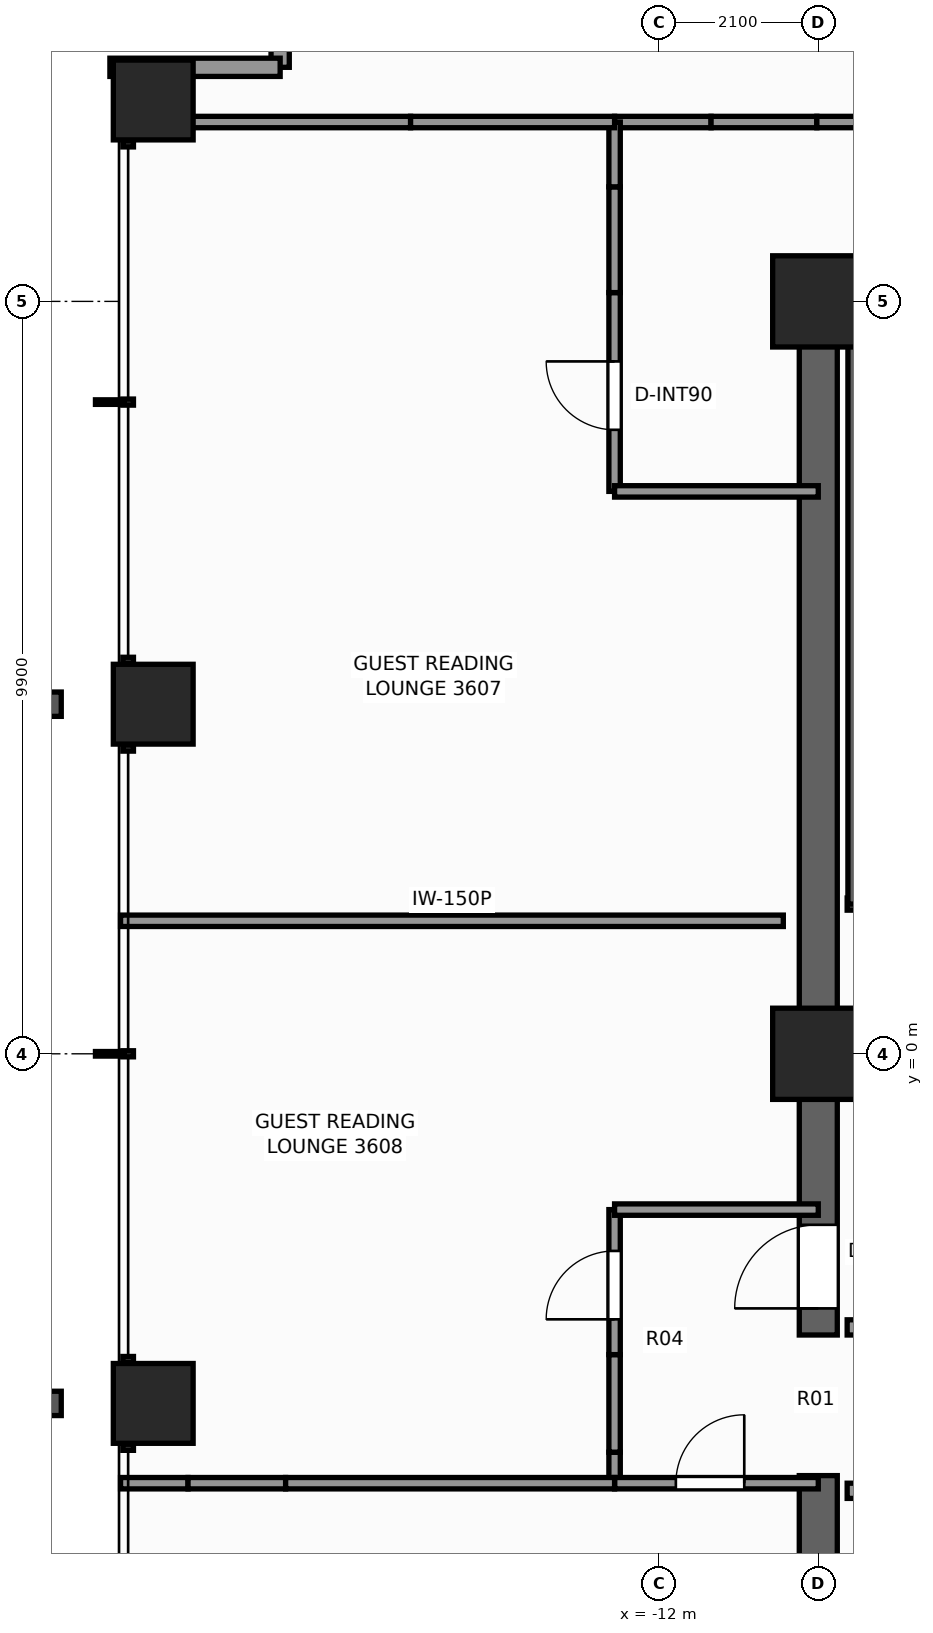
"""IFC4 building model, lengths in metres.
Left out: names, types, materials, properties, quantities, classifications, styles, units other than length and angle.
Written with IfcOpenShell. Run it as: python <this file> out.ifc"""

import sys

from ifc_helpers import new_model, si_unit, direction, frame, frame_2d, origin, origin_2d, place, context, subcontext, project, spatial, rectangle, extrude, element, fill, save


model = new_model("IFC4")
c1 = context("Model", 3, precision=1e-05, world=origin(), true_north=direction((0.0, 1.0)))
c2 = subcontext(c1, "Body", "Model", "MODEL_VIEW")
j1 = project(units=[si_unit("LENGTHUNIT", "METRE"), si_unit("PLANEANGLEUNIT", "RADIAN")], contexts=[c1])
p1 = place(None, origin())
s1 = spatial("IfcSite", under=j1, at=p1, CompositionType="ELEMENT")
p2 = place(p1, origin())
s2 = spatial("IfcBuilding", under=s1, at=p2, CompositionType="ELEMENT")
p3 = place(p2, frame((0.0, 0.0, 125.0)))
s3 = spatial("IfcBuildingStorey", under=s2, at=p3, CompositionType="ELEMENT", Elevation=125.0)
p4 = place(p3, frame((-10.15, 9.9, 0.0), z_axis=(0.0, 0.0, 1.0), x_axis=(1.0, 0.0, 0.0)))
e1 = element("IfcWall", 1, at=p4, inside=s3, PredefinedType="SHEAR", context=c2, shape_type="SweptSolid", body=[
    extrude(rectangle(XDim=14.57, YDim=0.5, at=frame_2d((7.285, 0.0))), origin(), (0.0, 0.0, 1.0), 3.3),
])
p5 = place(p3, frame((-9.9, -9.65, 0.0), z_axis=(0.0, 0.0, 1.0), x_axis=(0.0, 1.0, 0.0)))
e2 = element("IfcWall", 2, at=p5, inside=s3, PredefinedType="SHEAR", context=c2, shape_type="SweptSolid", body=[
    extrude(rectangle(XDim=4.1, YDim=0.5, at=frame_2d((2.05, 0.0))), origin(), (0.0, 0.0, 1.0), 3.3),
])
p6 = place(p3, frame((-9.9, -3.7, 0.0), z_axis=(0.0, 0.0, 1.0), x_axis=(0.0, 1.0, 0.0)))
e3 = element("IfcWall", 3, at=p6, inside=s3, PredefinedType="SHEAR", context=c2, shape_type="SweptSolid", body=[
    extrude(rectangle(XDim=13.35, YDim=0.5, at=frame_2d((6.675, 0.0))), origin(), (0.0, 0.0, 1.0), 3.3),
])
p7 = place(p6, frame((0.35, 0.0, 0.0)))
e4 = element("IfcOpeningElement", 4, at=p7, cuts=e3, PredefinedType="OPENING", context=c2, shape_type="SweptSolid", body=[
    extrude(rectangle(XDim=1.1, YDim=2.2, at=frame_2d((0.55, 1.1))), frame((0.0, 0.26, 0.0), z_axis=(0.0, -1.0, 0.0), x_axis=(1.0, 0.0, 0.0)), (0.0, 0.0, 1.0), 0.52),
])
for number, where, z_axis, x_axis in (
    (5, (-9.9, 9.9, 0.0), (0.0, 0.0, 1.0), (1.0, 0.0, 0.0)),
    (6, (-9.9, 0.0, 0.0), (0.0, 0.0, 1.0), (1.0, 0.0, 0.0)),
):
    element("IfcColumn", number, at=place(p3, frame(where, z_axis=z_axis, x_axis=x_axis)), inside=s3, PredefinedType="COLUMN", context=c2, shape_type="SweptSolid", body=[
        extrude(rectangle(XDim=1.2, YDim=1.2, at=origin_2d()), origin(), (0.0, 0.0, 1.0), 3.3),
    ])
for number, where, z_axis, x_axis in (
    (7, (-18.65, -4.6, 0.0), (0.0, 0.0, 1.0), (1.0, 0.0, 0.0)),
    (8, (-18.65, 4.6, 0.0), (0.0, 0.0, 1.0), (1.0, 0.0, 0.0)),
    (9, (-18.65, 12.55, 0.0), (0.0, 0.0, 1.0), (1.0, 0.0, 0.0)),
):
    element("IfcColumn", number, at=place(p3, frame(where, z_axis=z_axis, x_axis=x_axis)), inside=s3, PredefinedType="COLUMN", context=c2, shape_type="SweptSolid", body=[
        extrude(rectangle(XDim=1.05, YDim=1.05, at=origin_2d()), origin(), (0.0, 0.0, 1.0), 3.3),
    ])
for number, where, z_axis, x_axis in (
    (10, (-16.98, 12.98, 0.0), (0.0, 0.0, 1.0), (0.0, 1.0, 0.0)),
    (11, (-19.22, 12.98, 0.0), (0.0, 0.0, 1.0), (1.0, 0.0, 0.0)),
):
    element("IfcWall", number, at=place(p3, frame(where, z_axis=z_axis, x_axis=x_axis)), inside=s3, PredefinedType="STANDARD", context=c2, shape_type="SweptSolid", body=[
        extrude(rectangle(XDim=2.24, YDim=0.24, at=frame_2d((1.12, 0.0))), origin(), (0.0, 0.0, 1.0), 1.295),
    ])
p8 = place(p3, frame((-9.52, 1.97, 0.0), z_axis=(0.0, 0.0, 1.0), x_axis=(1.0, 0.0, 0.0)))
e12 = element("IfcWall", 12, at=p8, inside=s3, PredefinedType="SHEAR", context=c2, shape_type="SweptSolid", body=[
    extrude(rectangle(XDim=3.52, YDim=0.16, at=frame_2d((1.76, 0.0))), origin(), (0.0, 0.0, 1.0), 3.3),
])
p9 = place(p8, frame((1.15, 0.0, 0.0)))
e13 = element("IfcOpeningElement", 13, at=p9, cuts=e12, PredefinedType="OPENING", context=c2, shape_type="SweptSolid", body=[
    extrude(rectangle(XDim=1.1, YDim=2.2, at=frame_2d((0.55, 1.1))), frame((0.0, 0.09, 0.0), z_axis=(0.0, -1.0, 0.0), x_axis=(1.0, 0.0, 0.0)), (0.0, 0.0, 1.0), 0.18),
])
p10 = place(p3, frame((-9.52, 9.53, 0.0), z_axis=(0.0, 0.0, 1.0), x_axis=(1.0, 0.0, 0.0)))
e14 = element("IfcWall", 14, at=p10, inside=s3, PredefinedType="SHEAR", context=c2, shape_type="SweptSolid", body=[
    extrude(rectangle(XDim=3.52, YDim=0.16, at=frame_2d((1.76, 0.0))), origin(), (0.0, 0.0, 1.0), 3.3),
])
p11 = place(p3, frame((-9.43, 1.97, 0.0), z_axis=(0.0, 0.0, 1.0), x_axis=(0.0, 1.0, 0.0)))
e15 = element("IfcWall", 15, at=p11, inside=s3, PredefinedType="SHEAR", context=c2, shape_type="SweptSolid", body=[
    extrude(rectangle(XDim=7.56, YDim=0.16, at=frame_2d((3.78, 0.0))), origin(), (0.0, 0.0, 1.0), 3.3),
])
p12 = place(p3, frame((-9.52, -3.6, 0.0), z_axis=(0.0, 0.0, 1.0), x_axis=(1.0, 0.0, 0.0)))
e16 = element("IfcWall", 16, at=p12, inside=s3, PredefinedType="SOLIDWALL", context=c2, shape_type="SweptSolid", body=[
    extrude(rectangle(XDim=3.77, YDim=0.2, at=frame_2d((1.885, 0.0))), origin(), (0.0, 0.0, 1.0), 3.1),
])
p13 = place(p12, frame((1.15, 0.0, 0.0)))
e17 = element("IfcOpeningElement", 17, at=p13, cuts=e16, PredefinedType="OPENING", context=c2, shape_type="SweptSolid", body=[
    extrude(rectangle(XDim=0.95, YDim=2.06, at=frame_2d((0.475, 1.03))), frame((0.0, 0.11, 0.0), z_axis=(0.0, -1.0, 0.0), x_axis=(1.0, 0.0, 0.0)), (0.0, 0.0, 1.0), 0.22),
])
p14 = place(p3, frame((-9.52, -5.75, 0.0), z_axis=(0.0, 0.0, 1.0), x_axis=(1.0, 0.0, 0.0)))
e18 = element("IfcWall", 18, at=p14, inside=s3, PredefinedType="SOLIDWALL", context=c2, shape_type="SweptSolid", body=[
    extrude(rectangle(XDim=5.66, YDim=0.2, at=frame_2d((2.83, 0.0))), origin(), (0.0, 0.0, 1.0), 3.1),
])
p15 = place(p14, frame((0.55, 0.0, 0.0)))
e19 = element("IfcOpeningElement", 19, at=p15, cuts=e18, PredefinedType="OPENING", context=c2, shape_type="SweptSolid", body=[
    extrude(rectangle(XDim=1.1, YDim=2.2, at=frame_2d((0.55, 1.1))), frame((0.0, 0.11, 0.0), z_axis=(0.0, -1.0, 0.0), x_axis=(1.0, 0.0, 0.0)), (0.0, 0.0, 1.0), 0.22),
])
p16 = place(p14, frame((2.48, 0.0, 0.0)))
e20 = element("IfcOpeningElement", 20, at=p16, cuts=e18, PredefinedType="OPENING", context=c2, shape_type="SweptSolid", body=[
    extrude(rectangle(XDim=1.1, YDim=2.2, at=frame_2d((0.55, 1.1))), frame((0.0, 0.11, 0.0), z_axis=(0.0, -1.0, 0.0), x_axis=(1.0, 0.0, 0.0)), (0.0, 0.0, 1.0), 0.22),
])
p17 = place(p14, frame((4.41, 0.0, 0.0)))
e21 = element("IfcOpeningElement", 21, at=p17, cuts=e18, PredefinedType="OPENING", context=c2, shape_type="SweptSolid", body=[
    extrude(rectangle(XDim=1.1, YDim=2.2, at=frame_2d((0.55, 1.1))), frame((0.0, 0.11, 0.0), z_axis=(0.0, -1.0, 0.0), x_axis=(1.0, 0.0, 0.0)), (0.0, 0.0, 1.0), 0.22),
])
p18 = place(p3, frame((-12.58, 12.26, 0.0), z_axis=(0.0, 0.0, 1.0), x_axis=(1.0, 0.0, 0.0)))
e22 = element("IfcWall", 22, at=p18, inside=s3, PredefinedType="PARTITIONING", context=c2, shape_type="SweptSolid", body=[
    extrude(rectangle(XDim=1.27, YDim=0.15, at=frame_2d((0.635, 0.0))), origin(), (0.0, 0.0, 1.0), 3.1),
])
p19 = place(p3, frame((-11.311, 12.26, 0.0), z_axis=(0.0, 0.0, 1.0), x_axis=(1.0, 0.0, 0.0)))
e23 = element("IfcWall", 23, at=p19, inside=s3, PredefinedType="PARTITIONING", context=c2, shape_type="SweptSolid", body=[
    extrude(rectangle(XDim=1.392, YDim=0.15, at=frame_2d((0.696, 0.0))), origin(), (0.0, 0.0, 1.0), 1.285),
])
p20 = place(p3, frame((-9.919, 12.26, 0.0), z_axis=(0.0, 0.0, 1.0), x_axis=(1.0, 0.0, 0.0)))
e24 = element("IfcWall", 24, at=p20, inside=s3, PredefinedType="PARTITIONING", context=c2, shape_type="SweptSolid", body=[
    extrude(rectangle(XDim=4.677, YDim=0.15, at=frame_2d((2.338, 0.0))), origin(), (0.0, 0.0, 1.0), 3.1),
])
p21 = place(p20, frame((0.702, 0.0, 0.0)))
e25 = element("IfcOpeningElement", 25, at=p21, cuts=e24, PredefinedType="OPENING", context=c2, shape_type="SweptSolid", body=[
    extrude(rectangle(XDim=0.9, YDim=2.06, at=frame_2d((0.45, 1.03))), frame((0.0, 0.085, 0.0), z_axis=(0.0, -1.0, 0.0), x_axis=(1.0, 0.0, 0.0)), (0.0, 0.0, 1.0), 0.17),
])
p22 = place(p20, frame((3.037, 0.0, 0.0)))
e26 = element("IfcOpeningElement", 26, at=p22, cuts=e24, PredefinedType="OPENING", context=c2, shape_type="SweptSolid", body=[
    extrude(rectangle(XDim=0.9, YDim=2.06, at=frame_2d((0.45, 1.03))), frame((0.0, 0.085, 0.0), z_axis=(0.0, -1.0, 0.0), x_axis=(1.0, 0.0, 0.0)), (0.0, 0.0, 1.0), 0.17),
])
p23 = place(p3, frame((-12.58, 7.4, 0.0), z_axis=(0.0, 0.0, 1.0), x_axis=(0.0, 1.0, 0.0)))
e27 = element("IfcWall", 27, at=p23, inside=s3, PredefinedType="PARTITIONING", context=c2, shape_type="SweptSolid", body=[
    extrude(rectangle(XDim=2.616, YDim=0.15, at=frame_2d((1.308, 0.0))), origin(), (0.0, 0.0, 1.0), 3.1),
])
p24 = place(p23, frame((0.81, 0.0, 0.0)))
e28 = element("IfcOpeningElement", 28, at=p24, cuts=e27, PredefinedType="OPENING", context=c2, shape_type="SweptSolid", body=[
    extrude(rectangle(XDim=0.9, YDim=2.06, at=frame_2d((0.45, 1.03))), frame((0.0, 0.085, 0.0), z_axis=(0.0, -1.0, 0.0), x_axis=(1.0, 0.0, 0.0)), (0.0, 0.0, 1.0), 0.17),
])
p25 = place(p3, frame((-12.58, 10.016, 0.0), z_axis=(0.0, 0.0, 1.0), x_axis=(0.0, 1.0, 0.0)))
e29 = element("IfcWall", 29, at=p25, inside=s3, PredefinedType="PARTITIONING", context=c2, shape_type="SweptSolid", body=[
    extrude(rectangle(XDim=1.392, YDim=0.15, at=frame_2d((0.696, 0.0))), origin(), (0.0, 0.0, 1.0), 1.285),
])
p26 = place(p3, frame((-12.58, 11.407, 0.0), z_axis=(0.0, 0.0, 1.0), x_axis=(0.0, 1.0, 0.0)))
e30 = element("IfcWall", 30, at=p26, inside=s3, PredefinedType="PARTITIONING", context=c2, shape_type="SweptSolid", body=[
    extrude(rectangle(XDim=0.853, YDim=0.15, at=frame_2d((0.426, 0.0))), origin(), (0.0, 0.0, 1.0), 3.1),
])
p27 = place(p3, frame((-12.58, 7.4, 0.0), z_axis=(0.0, 0.0, 1.0), x_axis=(1.0, 0.0, 0.0)))
e31 = element("IfcWall", 31, at=p27, inside=s3, PredefinedType="PARTITIONING", context=c2, shape_type="SweptSolid", body=[
    extrude(rectangle(XDim=2.68, YDim=0.15, at=frame_2d((1.34, 0.0))), origin(), (0.0, 0.0, 1.0), 3.1),
])
p28 = place(p3, frame((-12.58, -5.65, 0.0), z_axis=(0.0, 0.0, 1.0), x_axis=(0.0, 1.0, 0.0)))
e32 = element("IfcWall", 32, at=p28, inside=s3, PredefinedType="PARTITIONING", context=c2, shape_type="SweptSolid", body=[
    extrude(rectangle(XDim=0.408, YDim=0.15, at=frame_2d((0.204, 0.0))), origin(), (0.0, 0.0, 1.0), 3.1),
])
p29 = place(p3, frame((-12.58, -5.242, 0.0), z_axis=(0.0, 0.0, 1.0), x_axis=(0.0, 1.0, 0.0)))
e33 = element("IfcWall", 33, at=p29, inside=s3, PredefinedType="PARTITIONING", context=c2, shape_type="SweptSolid", body=[
    extrude(rectangle(XDim=1.284, YDim=0.15, at=frame_2d((0.642, 0.0))), origin(), (0.0, 0.0, 1.0), 1.285),
])
p30 = place(p3, frame((-12.58, -3.958, 0.0), z_axis=(0.0, 0.0, 1.0), x_axis=(0.0, 1.0, 0.0)))
e34 = element("IfcWall", 34, at=p30, inside=s3, PredefinedType="PARTITIONING", context=c2, shape_type="SweptSolid", body=[
    extrude(rectangle(XDim=1.908, YDim=0.15, at=frame_2d((0.954, 0.0))), origin(), (0.0, 0.0, 1.0), 2.389),
])
p31 = place(p30, frame((0.464, 0.0, 0.0)))
e35 = element("IfcOpeningElement", 35, at=p31, cuts=e34, PredefinedType="OPENING", context=c2, shape_type="SweptSolid", body=[
    extrude(rectangle(XDim=0.9, YDim=2.06, at=frame_2d((0.45, 1.03))), frame((0.0, 0.085, 0.0), z_axis=(0.0, -1.0, 0.0), x_axis=(1.0, 0.0, 0.0)), (0.0, 0.0, 1.0), 0.17),
])
p32 = place(p3, frame((-12.58, -2.05, 0.0), z_axis=(0.0, 0.0, 1.0), x_axis=(1.0, 0.0, 0.0)))
e36 = element("IfcWall", 36, at=p32, inside=s3, PredefinedType="PARTITIONING", context=c2, shape_type="SweptSolid", body=[
    extrude(rectangle(XDim=2.68, YDim=0.15, at=frame_2d((1.34, 0.0))), origin(), (0.0, 0.0, 1.0), 3.1),
])
p33 = place(p3, frame((-12.58, -5.65, 0.0), z_axis=(0.0, 0.0, 1.0), x_axis=(1.0, 0.0, 0.0)))
e37 = element("IfcWall", 37, at=p33, inside=s3, PredefinedType="PARTITIONING", context=c2, shape_type="SweptSolid", body=[
    extrude(rectangle(XDim=2.68, YDim=0.15, at=frame_2d((1.34, 0.0))), origin(), (0.0, 0.0, 1.0), 3.1),
])
p34 = place(p33, frame((0.806, 0.0, 0.0)))
e38 = element("IfcOpeningElement", 38, at=p34, cuts=e37, PredefinedType="OPENING", context=c2, shape_type="SweptSolid", body=[
    extrude(rectangle(XDim=0.9, YDim=2.06, at=frame_2d((0.45, 1.03))), frame((0.0, 0.085, 0.0), z_axis=(0.0, -1.0, 0.0), x_axis=(1.0, 0.0, 0.0)), (0.0, 0.0, 1.0), 0.17),
])
p35 = place(p3, frame((-19.08, 12.26, 0.0), z_axis=(0.0, 0.0, 1.0), x_axis=(1.0, 0.0, 0.0)))
e39 = element("IfcWall", 39, at=p35, inside=s3, PredefinedType="PARTITIONING", context=c2, shape_type="SweptSolid", body=[
    extrude(rectangle(XDim=0.505, YDim=0.15, at=frame_2d((0.253, 0.0))), origin(), (0.0, 0.0, 1.0), 2.469),
])
p36 = place(p3, frame((-18.575, 12.26, 0.0), z_axis=(0.0, 0.0, 1.0), x_axis=(1.0, 0.0, 0.0)))
e40 = element("IfcWall", 40, at=p36, inside=s3, PredefinedType="PARTITIONING", context=c2, shape_type="SweptSolid", body=[
    extrude(rectangle(XDim=3.311, YDim=0.15, at=frame_2d((1.655, 0.0))), origin(), (0.0, 0.0, 1.0), 1.285),
])
p37 = place(p3, frame((-15.264, 12.26, 0.0), z_axis=(0.0, 0.0, 1.0), x_axis=(1.0, 0.0, 0.0)))
e41 = element("IfcWall", 41, at=p37, inside=s3, PredefinedType="PARTITIONING", context=c2, shape_type="SweptSolid", body=[
    extrude(rectangle(XDim=2.684, YDim=0.15, at=frame_2d((1.342, 0.0))), origin(), (0.0, 0.0, 1.0), 3.1),
])
p38 = place(p3, frame((-19.08, 1.75, 0.0), z_axis=(0.0, 0.0, 1.0), x_axis=(1.0, 0.0, 0.0)))
e42 = element("IfcWall", 42, at=p38, inside=s3, PredefinedType="PARTITIONING", context=c2, shape_type="SweptSolid", body=[
    extrude(rectangle(XDim=8.72, YDim=0.15, at=frame_2d((4.36, 0.0))), origin(), (0.0, 0.0, 1.0), 2.469),
])
p39 = place(p3, frame((-19.08, -5.65, 0.0), z_axis=(0.0, 0.0, 1.0), x_axis=(1.0, 0.0, 0.0)))
e43 = element("IfcWall", 43, at=p39, inside=s3, PredefinedType="PARTITIONING", context=c2, shape_type="SweptSolid", body=[
    extrude(rectangle(XDim=0.888, YDim=0.15, at=frame_2d((0.444, 0.0))), origin(), (0.0, 0.0, 1.0), 2.469),
])
p40 = place(p3, frame((-18.192, -5.65, 0.0), z_axis=(0.0, 0.0, 1.0), x_axis=(1.0, 0.0, 0.0)))
e44 = element("IfcWall", 44, at=p40, inside=s3, PredefinedType="PARTITIONING", context=c2, shape_type="SweptSolid", body=[
    extrude(rectangle(XDim=1.284, YDim=0.15, at=frame_2d((0.642, 0.0))), origin(), (0.0, 0.0, 1.0), 1.285),
])
p41 = place(p3, frame((-16.908, -5.65, 0.0), z_axis=(0.0, 0.0, 1.0), x_axis=(1.0, 0.0, 0.0)))
e45 = element("IfcWall", 45, at=p41, inside=s3, PredefinedType="PARTITIONING", context=c2, shape_type="SweptSolid", body=[
    extrude(rectangle(XDim=4.328, YDim=0.15, at=frame_2d((2.164, 0.0))), origin(), (0.0, 0.0, 1.0), 3.1),
])
p42 = place(p7, origin())
e46 = element("IfcDoor", 46, at=p42, inside=s3, OperationType="SINGLE_SWING_LEFT", PredefinedType="DOOR", context=c2, shape_type="SweptSolid", body=[
    extrude(rectangle(XDim=1.1, YDim=2.2, at=frame_2d((0.55, 1.1))), frame((0.0, 0.025, 0.0), z_axis=(0.0, -1.0, 0.0), x_axis=(1.0, 0.0, 0.0)), (0.0, 0.0, 1.0), 0.05),
])
fill(e4, e46)
p43 = place(p24, origin())
e47 = element("IfcDoor", 47, at=p43, inside=s3, OperationType="SINGLE_SWING_RIGHT", PredefinedType="DOOR", context=c2, shape_type="SweptSolid", body=[
    extrude(rectangle(XDim=0.9, YDim=2.06, at=frame_2d((0.45, 1.03))), frame((0.0, 0.025, 0.0), z_axis=(0.0, -1.0, 0.0), x_axis=(1.0, 0.0, 0.0)), (0.0, 0.0, 1.0), 0.05),
])
fill(e28, e47)
p44 = place(p31, origin())
e48 = element("IfcDoor", 48, at=p44, inside=s3, OperationType="SINGLE_SWING_LEFT", PredefinedType="DOOR", context=c2, shape_type="SweptSolid", body=[
    extrude(rectangle(XDim=0.9, YDim=2.06, at=frame_2d((0.45, 1.03))), frame((0.0, 0.025, 0.0), z_axis=(0.0, -1.0, 0.0), x_axis=(1.0, 0.0, 0.0)), (0.0, 0.0, 1.0), 0.05),
])
fill(e35, e48)
p45 = place(p34, origin())
e49 = element("IfcDoor", 49, at=p45, inside=s3, OperationType="SINGLE_SWING_RIGHT", PredefinedType="DOOR", context=c2, shape_type="SweptSolid", body=[
    extrude(rectangle(XDim=0.9, YDim=2.06, at=frame_2d((0.45, 1.03))), frame((0.0, 0.025, 0.0), z_axis=(0.0, -1.0, 0.0), x_axis=(1.0, 0.0, 0.0)), (0.0, 0.0, 1.0), 0.05),
])
fill(e38, e49)
save(model, sys.argv[1])
